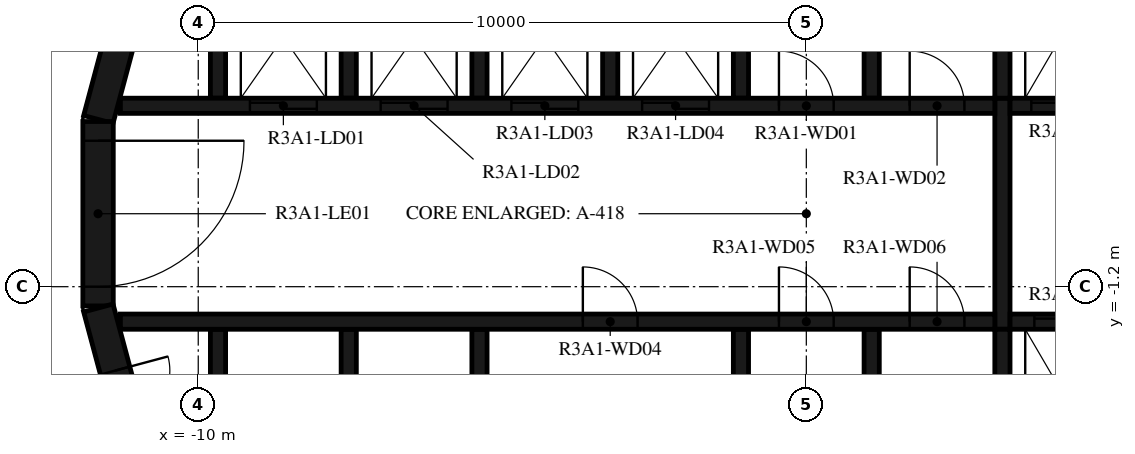
"""IFC4 building model, lengths in metres.
Left out: names, types, materials, properties, quantities, classifications, styles, units other than length and angle.
Written with IfcOpenShell. Run it as: python <this file> out.ifc"""

import sys

from ifc_helpers import new_model, si_unit, direction, frame, frame_2d, origin, place, context, subcontext, project, spatial, polyline, rectangle, outline, extrude, element, fill, save


model = new_model("IFC4")
c1 = context("Model", 3, precision=1e-05, world=origin(), true_north=direction((0.0, 1.0)))
c2 = subcontext(c1, "Body", "Model", "MODEL_VIEW")
j1 = project(units=[si_unit("LENGTHUNIT", "METRE"), si_unit("PLANEANGLEUNIT", "RADIAN")], contexts=[c1])
p1 = place(None, origin())
s1 = spatial("IfcSite", under=j1, at=p1, CompositionType="ELEMENT")
p2 = place(p1, origin())
s2 = spatial("IfcBuilding", under=s1, at=p2, CompositionType="ELEMENT")
p3 = place(p2, frame((0.0, 0.0, 116.9)))
s3 = spatial("IfcBuildingStorey", under=s2, at=p3, CompositionType="ELEMENT", Elevation=116.9)
p4 = place(p3, frame((-10.858, 4.479, 0.0), z_axis=(0.0, 0.0, 1.0), x_axis=(-0.258734743916, -0.965948410781, 0.0)))
e1 = element("IfcWall", 1, at=p4, inside=s3, PredefinedType="SHEAR", context=c2, shape_type="SweptSolid", body=[
    extrude(rectangle(XDim=3.033, YDim=0.5, at=frame_2d((1.516, 0.0))), origin(), (0.0, 0.0, 1.0), 3.12),
])
p5 = place(p3, frame((-11.647, 1.516, 0.0), z_axis=(0.0, 0.0, 1.0), x_axis=(0.0, -1.0, 0.0)))
e2 = element("IfcWall", 2, at=p5, inside=s3, PredefinedType="SHEAR", context=c2, shape_type="SweptSolid", body=[
    extrude(rectangle(XDim=3.033, YDim=0.5, at=frame_2d((1.516, 0.0))), origin(), (0.0, 0.0, 1.0), 3.12),
])
p6 = place(p5, frame((0.316, 0.0, 0.0)))
e3 = element("IfcOpeningElement", 3, at=p6, cuts=e2, PredefinedType="OPENING", context=c2, shape_type="SweptSolid", body=[
    extrude(rectangle(XDim=2.4, YDim=2.1, at=frame_2d((1.2, 1.05))), frame((0.0, 0.26, 0.0), z_axis=(0.0, -1.0, 0.0), x_axis=(1.0, 0.0, 0.0)), (0.0, 0.0, 1.0), 0.52),
])
p7 = place(p3, frame((-11.643, -1.55, 0.0), z_axis=(0.0, 0.0, 1.0), x_axis=(0.258734743916, -0.965948410781, 0.0)))
e4 = element("IfcWall", 4, at=p7, inside=s3, PredefinedType="SHEAR", context=c2, shape_type="SweptSolid", body=[
    extrude(rectangle(XDim=3.033, YDim=0.5, at=frame_2d((1.516, 0.0))), origin(), (0.0, 0.0, 1.0), 3.12),
])
p8 = place(p7, frame((1.066, 0.0, 0.0)))
e5 = element("IfcOpeningElement", 5, at=p8, cuts=e4, PredefinedType="OPENING", context=c2, shape_type="SweptSolid", body=[
    extrude(rectangle(XDim=0.9, YDim=2.1, at=frame_2d((0.45, 1.05))), frame((0.0, 0.26, 0.0), z_axis=(0.0, -1.0, 0.0), x_axis=(1.0, 0.0, 0.0)), (0.0, 0.0, 1.0), 0.52),
])
p9 = place(p3, origin())
e6 = element("IfcWall", 6, at=p9, inside=s3, PredefinedType="SHEAR", context=c2, shape_type="SweptSolid", body=[
    extrude(outline(polyline([(-9.55, 4.8), (-7.65, 4.8), (-7.65, 1.9), (-7.4, 1.9), (-7.4, 4.8), (-5.5, 4.8), (-5.5, 1.9), (-5.25, 1.9), (-5.25, 4.8), (-3.35, 4.8), (-3.35, 1.9), (-3.1, 1.9), (-3.1, 4.8), (-1.2, 4.8), (-1.2, 1.9), (-0.95, 1.9), (-0.95, 4.8), (0.95, 4.8), (0.95, 1.9), (1.2, 1.9), (1.2, 4.8), (3.1, 4.8), (3.1, 1.9), (3.35, 1.9), (3.35, 4.8), (5.25, 4.8), (5.25, 1.9), (5.5, 1.9), (5.5, 4.8), (7.4, 4.8), (7.4, 1.9), (7.65, 1.9), (7.65, 4.8), (9.55, 4.8), (9.55, 1.9), (9.8, 1.9), (9.8, 4.8), (9.8, 5.05), (-9.8, 5.05), (-9.8, 4.8), (-9.8, 1.9), (-9.55, 1.9), (-9.55, 4.8)])), origin(), (0.0, 0.0, 1.0), 3.12),
])
p10 = place(p3, origin())
e7 = element("IfcWall", 7, at=p10, inside=s3, PredefinedType="SHEAR", context=c2, shape_type="SweptSolid", body=[
    extrude(outline(polyline([(9.8, -5.05), (9.8, -4.8), (9.8, -1.9), (9.55, -1.9), (9.55, -4.8), (7.65, -4.8), (7.65, -1.9), (7.4, -1.9), (7.4, -4.8), (5.5, -4.8), (5.5, -1.9), (5.25, -1.9), (5.25, -4.8), (3.35, -4.8), (3.35, -1.9), (3.1, -1.9), (3.1, -4.8), (1.2, -4.8), (1.2, -1.9), (0.95, -1.9), (0.95, -4.8), (-0.95, -4.8), (-0.95, -1.9), (-1.2, -1.9), (-1.2, -4.8), (-5.25, -4.8), (-5.25, -1.9), (-5.5, -1.9), (-5.5, -4.8), (-7.4, -4.8), (-7.4, -1.9), (-7.65, -1.9), (-7.65, -4.8), (-9.55, -4.8), (-9.55, -1.9), (-9.8, -1.9), (-9.8, -4.8), (-9.8, -5.05), (9.8, -5.05)])), origin(), (0.0, 0.0, 1.0), 3.12),
])
p11 = place(p3, frame((-11.28, 1.775, 0.0), z_axis=(0.0, 0.0, 1.0), x_axis=(1.0, 0.0, 0.0)))
e8 = element("IfcWall", 8, at=p11, inside=s3, PredefinedType="SHEAR", context=c2, shape_type="SweptSolid", body=[
    extrude(rectangle(XDim=14.38, YDim=0.25, at=frame_2d((7.19, 0.0))), origin(), (0.0, 0.0, 1.0), 3.12),
])
p12 = place(p11, frame((2.13, 0.0, 0.0)))
e9 = element("IfcOpeningElement", 9, at=p12, cuts=e8, PredefinedType="OPENING", context=c2, shape_type="SweptSolid", body=[
    extrude(rectangle(XDim=1.1, YDim=2.1, at=frame_2d((0.55, 1.05))), frame((0.0, 0.135, 0.0), z_axis=(0.0, -1.0, 0.0), x_axis=(1.0, 0.0, 0.0)), (0.0, 0.0, 1.0), 0.27),
])
p13 = place(p11, frame((4.28, 0.0, 0.0)))
e10 = element("IfcOpeningElement", 10, at=p13, cuts=e8, PredefinedType="OPENING", context=c2, shape_type="SweptSolid", body=[
    extrude(rectangle(XDim=1.1, YDim=2.1, at=frame_2d((0.55, 1.05))), frame((0.0, 0.135, 0.0), z_axis=(0.0, -1.0, 0.0), x_axis=(1.0, 0.0, 0.0)), (0.0, 0.0, 1.0), 0.27),
])
p14 = place(p11, frame((6.43, 0.0, 0.0)))
e11 = element("IfcOpeningElement", 11, at=p14, cuts=e8, PredefinedType="OPENING", context=c2, shape_type="SweptSolid", body=[
    extrude(rectangle(XDim=1.1, YDim=2.1, at=frame_2d((0.55, 1.05))), frame((0.0, 0.135, 0.0), z_axis=(0.0, -1.0, 0.0), x_axis=(1.0, 0.0, 0.0)), (0.0, 0.0, 1.0), 0.27),
])
p15 = place(p11, frame((8.58, 0.0, 0.0)))
e12 = element("IfcOpeningElement", 12, at=p15, cuts=e8, PredefinedType="OPENING", context=c2, shape_type="SweptSolid", body=[
    extrude(rectangle(XDim=1.1, YDim=2.1, at=frame_2d((0.55, 1.05))), frame((0.0, 0.135, 0.0), z_axis=(0.0, -1.0, 0.0), x_axis=(1.0, 0.0, 0.0)), (0.0, 0.0, 1.0), 0.27),
])
p16 = place(p11, frame((10.83, 0.0, 0.0)))
e13 = element("IfcOpeningElement", 13, at=p16, cuts=e8, PredefinedType="OPENING", context=c2, shape_type="SweptSolid", body=[
    extrude(rectangle(XDim=0.9, YDim=2.1, at=frame_2d((0.45, 1.05))), frame((0.0, 0.135, 0.0), z_axis=(0.0, -1.0, 0.0), x_axis=(1.0, 0.0, 0.0)), (0.0, 0.0, 1.0), 0.27),
])
p17 = place(p11, frame((12.98, 0.0, 0.0)))
e14 = element("IfcOpeningElement", 14, at=p17, cuts=e8, PredefinedType="OPENING", context=c2, shape_type="SweptSolid", body=[
    extrude(rectangle(XDim=0.9, YDim=2.1, at=frame_2d((0.45, 1.05))), frame((0.0, 0.135, 0.0), z_axis=(0.0, -1.0, 0.0), x_axis=(1.0, 0.0, 0.0)), (0.0, 0.0, 1.0), 0.27),
])
p18 = place(p3, frame((3.35, 1.775, 0.0), z_axis=(0.0, 0.0, 1.0), x_axis=(1.0, 0.0, 0.0)))
e15 = element("IfcWall", 15, at=p18, inside=s3, PredefinedType="SHEAR", context=c2, shape_type="SweptSolid", body=[
    extrude(rectangle(XDim=7.93, YDim=0.25, at=frame_2d((3.965, 0.0))), origin(), (0.0, 0.0, 1.0), 3.12),
])
p19 = place(p18, frame((0.35, 0.0, 0.0)))
e16 = element("IfcOpeningElement", 16, at=p19, cuts=e15, PredefinedType="OPENING", context=c2, shape_type="SweptSolid", body=[
    extrude(rectangle(XDim=1.2, YDim=2.4, at=frame_2d((0.6, 1.2))), frame((0.0, 0.135, 0.0), z_axis=(0.0, -1.0, 0.0), x_axis=(1.0, 0.0, 0.0)), (0.0, 0.0, 1.0), 0.27),
])
p20 = place(p18, frame((2.5, 0.0, 0.0)))
e17 = element("IfcOpeningElement", 17, at=p20, cuts=e15, PredefinedType="OPENING", context=c2, shape_type="SweptSolid", body=[
    extrude(rectangle(XDim=1.2, YDim=2.4, at=frame_2d((0.6, 1.2))), frame((0.0, 0.135, 0.0), z_axis=(0.0, -1.0, 0.0), x_axis=(1.0, 0.0, 0.0)), (0.0, 0.0, 1.0), 0.27),
])
p21 = place(p18, frame((4.8, 0.0, 0.0)))
e18 = element("IfcOpeningElement", 18, at=p21, cuts=e15, PredefinedType="OPENING", context=c2, shape_type="SweptSolid", body=[
    extrude(rectangle(XDim=0.9, YDim=2.1, at=frame_2d((0.45, 1.05))), frame((0.0, 0.135, 0.0), z_axis=(0.0, -1.0, 0.0), x_axis=(1.0, 0.0, 0.0)), (0.0, 0.0, 1.0), 0.27),
])
p22 = place(p3, frame((-11.28, -1.775, 0.0), z_axis=(0.0, 0.0, 1.0), x_axis=(1.0, 0.0, 0.0)))
e19 = element("IfcWall", 19, at=p22, inside=s3, PredefinedType="SHEAR", context=c2, shape_type="SweptSolid", body=[
    extrude(rectangle(XDim=14.38, YDim=0.25, at=frame_2d((7.19, 0.0))), origin(), (0.0, 0.0, 1.0), 3.12),
])
p23 = place(p22, frame((7.605, 0.0, 0.0)))
e20 = element("IfcOpeningElement", 20, at=p23, cuts=e19, PredefinedType="OPENING", context=c2, shape_type="SweptSolid", body=[
    extrude(rectangle(XDim=0.9, YDim=2.1, at=frame_2d((0.45, 1.05))), frame((0.0, 0.135, 0.0), z_axis=(0.0, -1.0, 0.0), x_axis=(1.0, 0.0, 0.0)), (0.0, 0.0, 1.0), 0.27),
])
p24 = place(p22, frame((10.83, 0.0, 0.0)))
e21 = element("IfcOpeningElement", 21, at=p24, cuts=e19, PredefinedType="OPENING", context=c2, shape_type="SweptSolid", body=[
    extrude(rectangle(XDim=0.9, YDim=2.1, at=frame_2d((0.45, 1.05))), frame((0.0, 0.135, 0.0), z_axis=(0.0, -1.0, 0.0), x_axis=(1.0, 0.0, 0.0)), (0.0, 0.0, 1.0), 0.27),
])
p25 = place(p22, frame((12.98, 0.0, 0.0)))
e22 = element("IfcOpeningElement", 22, at=p25, cuts=e19, PredefinedType="OPENING", context=c2, shape_type="SweptSolid", body=[
    extrude(rectangle(XDim=0.9, YDim=2.1, at=frame_2d((0.45, 1.05))), frame((0.0, 0.135, 0.0), z_axis=(0.0, -1.0, 0.0), x_axis=(1.0, 0.0, 0.0)), (0.0, 0.0, 1.0), 0.27),
])
p26 = place(p3, frame((3.35, -1.775, 0.0), z_axis=(0.0, 0.0, 1.0), x_axis=(1.0, 0.0, 0.0)))
e23 = element("IfcWall", 23, at=p26, inside=s3, PredefinedType="SHEAR", context=c2, shape_type="SweptSolid", body=[
    extrude(rectangle(XDim=7.93, YDim=0.25, at=frame_2d((3.965, 0.0))), origin(), (0.0, 0.0, 1.0), 3.12),
])
p27 = place(p26, frame((0.4, 0.0, 0.0)))
e24 = element("IfcOpeningElement", 24, at=p27, cuts=e23, PredefinedType="OPENING", context=c2, shape_type="SweptSolid", body=[
    extrude(rectangle(XDim=1.1, YDim=2.4, at=frame_2d((0.55, 1.2))), frame((0.0, 0.135, 0.0), z_axis=(0.0, -1.0, 0.0), x_axis=(1.0, 0.0, 0.0)), (0.0, 0.0, 1.0), 0.27),
])
p28 = place(p26, frame((2.55, 0.0, 0.0)))
e25 = element("IfcOpeningElement", 25, at=p28, cuts=e23, PredefinedType="OPENING", context=c2, shape_type="SweptSolid", body=[
    extrude(rectangle(XDim=1.1, YDim=2.4, at=frame_2d((0.55, 1.2))), frame((0.0, 0.135, 0.0), z_axis=(0.0, -1.0, 0.0), x_axis=(1.0, 0.0, 0.0)), (0.0, 0.0, 1.0), 0.27),
])
p29 = place(p26, frame((4.7, 0.0, 0.0)))
e26 = element("IfcOpeningElement", 26, at=p29, cuts=e23, PredefinedType="OPENING", context=c2, shape_type="SweptSolid", body=[
    extrude(rectangle(XDim=1.1, YDim=2.4, at=frame_2d((0.55, 1.2))), frame((0.0, 0.135, 0.0), z_axis=(0.0, -1.0, 0.0), x_axis=(1.0, 0.0, 0.0)), (0.0, 0.0, 1.0), 0.27),
])
p30 = place(p3, frame((3.225, -1.9, 0.0), z_axis=(0.0, 0.0, 1.0), x_axis=(0.0, 1.0, 0.0)))
e27 = element("IfcWall", 27, at=p30, inside=s3, PredefinedType="SHEAR", context=c2, shape_type="SweptSolid", body=[
    extrude(rectangle(XDim=3.8, YDim=0.25, at=frame_2d((1.9, 0.0))), origin(), (0.0, 0.0, 1.0), 3.12),
])
p31 = place(p3, frame((-12.028, 7.516, 0.0), z_axis=(0.0, 0.0, 1.0), x_axis=(-0.292365533182, -0.956306642771, 0.0)))
e28 = element("IfcWall", 28, at=p31, inside=s3, PredefinedType="STANDARD", context=c2, shape_type="SweptSolid", body=[
    extrude(rectangle(XDim=7.342, YDim=0.2, at=frame_2d((3.671, 0.0))), origin(), (0.0, 0.0, 1.0), 3.12),
])
p32 = place(p31, frame((2.533, 0.0, 0.0)))
e29 = element("IfcOpeningElement", 29, at=p32, cuts=e28, PredefinedType="OPENING", context=c2, shape_type="SweptSolid", body=[
    extrude(rectangle(XDim=1.0, YDim=2.1, at=frame_2d((0.5, 1.05))), frame((0.0, 0.11, 0.0), z_axis=(0.0, -1.0, 0.0), x_axis=(1.0, 0.0, 0.0)), (0.0, 0.0, 1.0), 0.22),
])
p33 = place(p6, origin())
e30 = element("IfcDoor", 30, at=p33, inside=s3, OperationType="DOUBLE_DOOR_SINGLE_SWING", PredefinedType="DOOR", context=c2, shape_type="SweptSolid", body=[
    extrude(rectangle(XDim=2.4, YDim=2.1, at=frame_2d((1.2, 1.05))), frame((0.0, 0.025, 0.0), z_axis=(0.0, -1.0, 0.0), x_axis=(1.0, 0.0, 0.0)), (0.0, 0.0, 1.0), 0.05),
])
fill(e3, e30)
p34 = place(p12, origin())
e31 = element("IfcDoor", 31, at=p34, inside=s3, OperationType="DOUBLE_DOOR_SLIDING", PredefinedType="DOOR", context=c2, shape_type="SweptSolid", body=[
    extrude(rectangle(XDim=1.1, YDim=2.1, at=frame_2d((0.55, 1.05))), frame((0.0, 0.025, 0.0), z_axis=(0.0, -1.0, 0.0), x_axis=(1.0, 0.0, 0.0)), (0.0, 0.0, 1.0), 0.05),
])
fill(e9, e31)
p35 = place(p13, origin())
e32 = element("IfcDoor", 32, at=p35, inside=s3, OperationType="DOUBLE_DOOR_SLIDING", PredefinedType="DOOR", context=c2, shape_type="SweptSolid", body=[
    extrude(rectangle(XDim=1.1, YDim=2.1, at=frame_2d((0.55, 1.05))), frame((0.0, 0.025, 0.0), z_axis=(0.0, -1.0, 0.0), x_axis=(1.0, 0.0, 0.0)), (0.0, 0.0, 1.0), 0.05),
])
fill(e10, e32)
p36 = place(p14, origin())
e33 = element("IfcDoor", 33, at=p36, inside=s3, OperationType="DOUBLE_DOOR_SLIDING", PredefinedType="DOOR", context=c2, shape_type="SweptSolid", body=[
    extrude(rectangle(XDim=1.1, YDim=2.1, at=frame_2d((0.55, 1.05))), frame((0.0, 0.025, 0.0), z_axis=(0.0, -1.0, 0.0), x_axis=(1.0, 0.0, 0.0)), (0.0, 0.0, 1.0), 0.05),
])
fill(e11, e33)
p37 = place(p15, origin())
e34 = element("IfcDoor", 34, at=p37, inside=s3, OperationType="DOUBLE_DOOR_SLIDING", PredefinedType="DOOR", context=c2, shape_type="SweptSolid", body=[
    extrude(rectangle(XDim=1.1, YDim=2.1, at=frame_2d((0.55, 1.05))), frame((0.0, 0.025, 0.0), z_axis=(0.0, -1.0, 0.0), x_axis=(1.0, 0.0, 0.0)), (0.0, 0.0, 1.0), 0.05),
])
fill(e12, e34)
p38 = place(p19, origin())
e35 = element("IfcDoor", 35, at=p38, inside=s3, OperationType="DOUBLE_DOOR_SLIDING", PredefinedType="DOOR", context=c2, shape_type="SweptSolid", body=[
    extrude(rectangle(XDim=1.2, YDim=2.4, at=frame_2d((0.6, 1.2))), frame((0.0, 0.025, 0.0), z_axis=(0.0, -1.0, 0.0), x_axis=(1.0, 0.0, 0.0)), (0.0, 0.0, 1.0), 0.05),
])
fill(e16, e35)
p39 = place(p27, origin())
e36 = element("IfcDoor", 36, at=p39, inside=s3, OperationType="DOUBLE_DOOR_SLIDING", PredefinedType="DOOR", context=c2, shape_type="SweptSolid", body=[
    extrude(rectangle(XDim=1.1, YDim=2.4, at=frame_2d((0.55, 1.2))), frame((0.0, 0.025, 0.0), z_axis=(0.0, -1.0, 0.0), x_axis=(1.0, 0.0, 0.0)), (0.0, 0.0, 1.0), 0.05),
])
fill(e24, e36)
p40 = place(p16, origin())
e37 = element("IfcDoor", 37, at=p40, inside=s3, OperationType="SINGLE_SWING_RIGHT", PredefinedType="DOOR", context=c2, shape_type="SweptSolid", body=[
    extrude(rectangle(XDim=0.9, YDim=2.1, at=frame_2d((0.45, 1.05))), frame((0.0, 0.025, 0.0), z_axis=(0.0, -1.0, 0.0), x_axis=(1.0, 0.0, 0.0)), (0.0, 0.0, 1.0), 0.05),
])
fill(e13, e37)
p41 = place(p17, origin())
e38 = element("IfcDoor", 38, at=p41, inside=s3, OperationType="SINGLE_SWING_LEFT", PredefinedType="DOOR", context=c2, shape_type="SweptSolid", body=[
    extrude(rectangle(XDim=0.9, YDim=2.1, at=frame_2d((0.45, 1.05))), frame((0.0, 0.025, 0.0), z_axis=(0.0, -1.0, 0.0), x_axis=(1.0, 0.0, 0.0)), (0.0, 0.0, 1.0), 0.05),
])
fill(e14, e38)
p42 = place(p23, origin())
e39 = element("IfcDoor", 39, at=p42, inside=s3, OperationType="SINGLE_SWING_LEFT", PredefinedType="DOOR", context=c2, shape_type="SweptSolid", body=[
    extrude(rectangle(XDim=0.9, YDim=2.1, at=frame_2d((0.45, 1.05))), frame((0.0, 0.025, 0.0), z_axis=(0.0, -1.0, 0.0), x_axis=(1.0, 0.0, 0.0)), (0.0, 0.0, 1.0), 0.05),
])
fill(e20, e39)
p43 = place(p24, origin())
e40 = element("IfcDoor", 40, at=p43, inside=s3, OperationType="SINGLE_SWING_RIGHT", PredefinedType="DOOR", context=c2, shape_type="SweptSolid", body=[
    extrude(rectangle(XDim=0.9, YDim=2.1, at=frame_2d((0.45, 1.05))), frame((0.0, 0.025, 0.0), z_axis=(0.0, -1.0, 0.0), x_axis=(1.0, 0.0, 0.0)), (0.0, 0.0, 1.0), 0.05),
])
fill(e21, e40)
p44 = place(p25, origin())
e41 = element("IfcDoor", 41, at=p44, inside=s3, OperationType="SINGLE_SWING_LEFT", PredefinedType="DOOR", context=c2, shape_type="SweptSolid", body=[
    extrude(rectangle(XDim=0.9, YDim=2.1, at=frame_2d((0.45, 1.05))), frame((0.0, 0.025, 0.0), z_axis=(0.0, -1.0, 0.0), x_axis=(1.0, 0.0, 0.0)), (0.0, 0.0, 1.0), 0.05),
])
fill(e22, e41)
p45 = place(p8, origin())
e42 = element("IfcDoor", 42, at=p45, inside=s3, OperationType="SINGLE_SWING_RIGHT", PredefinedType="DOOR", context=c2, shape_type="SweptSolid", body=[
    extrude(rectangle(XDim=0.9, YDim=2.1, at=frame_2d((0.45, 1.05))), frame((0.0, 0.025, 0.0), z_axis=(0.0, -1.0, 0.0), x_axis=(1.0, 0.0, 0.0)), (0.0, 0.0, 1.0), 0.05),
])
fill(e5, e42)
save(model, sys.argv[1])
